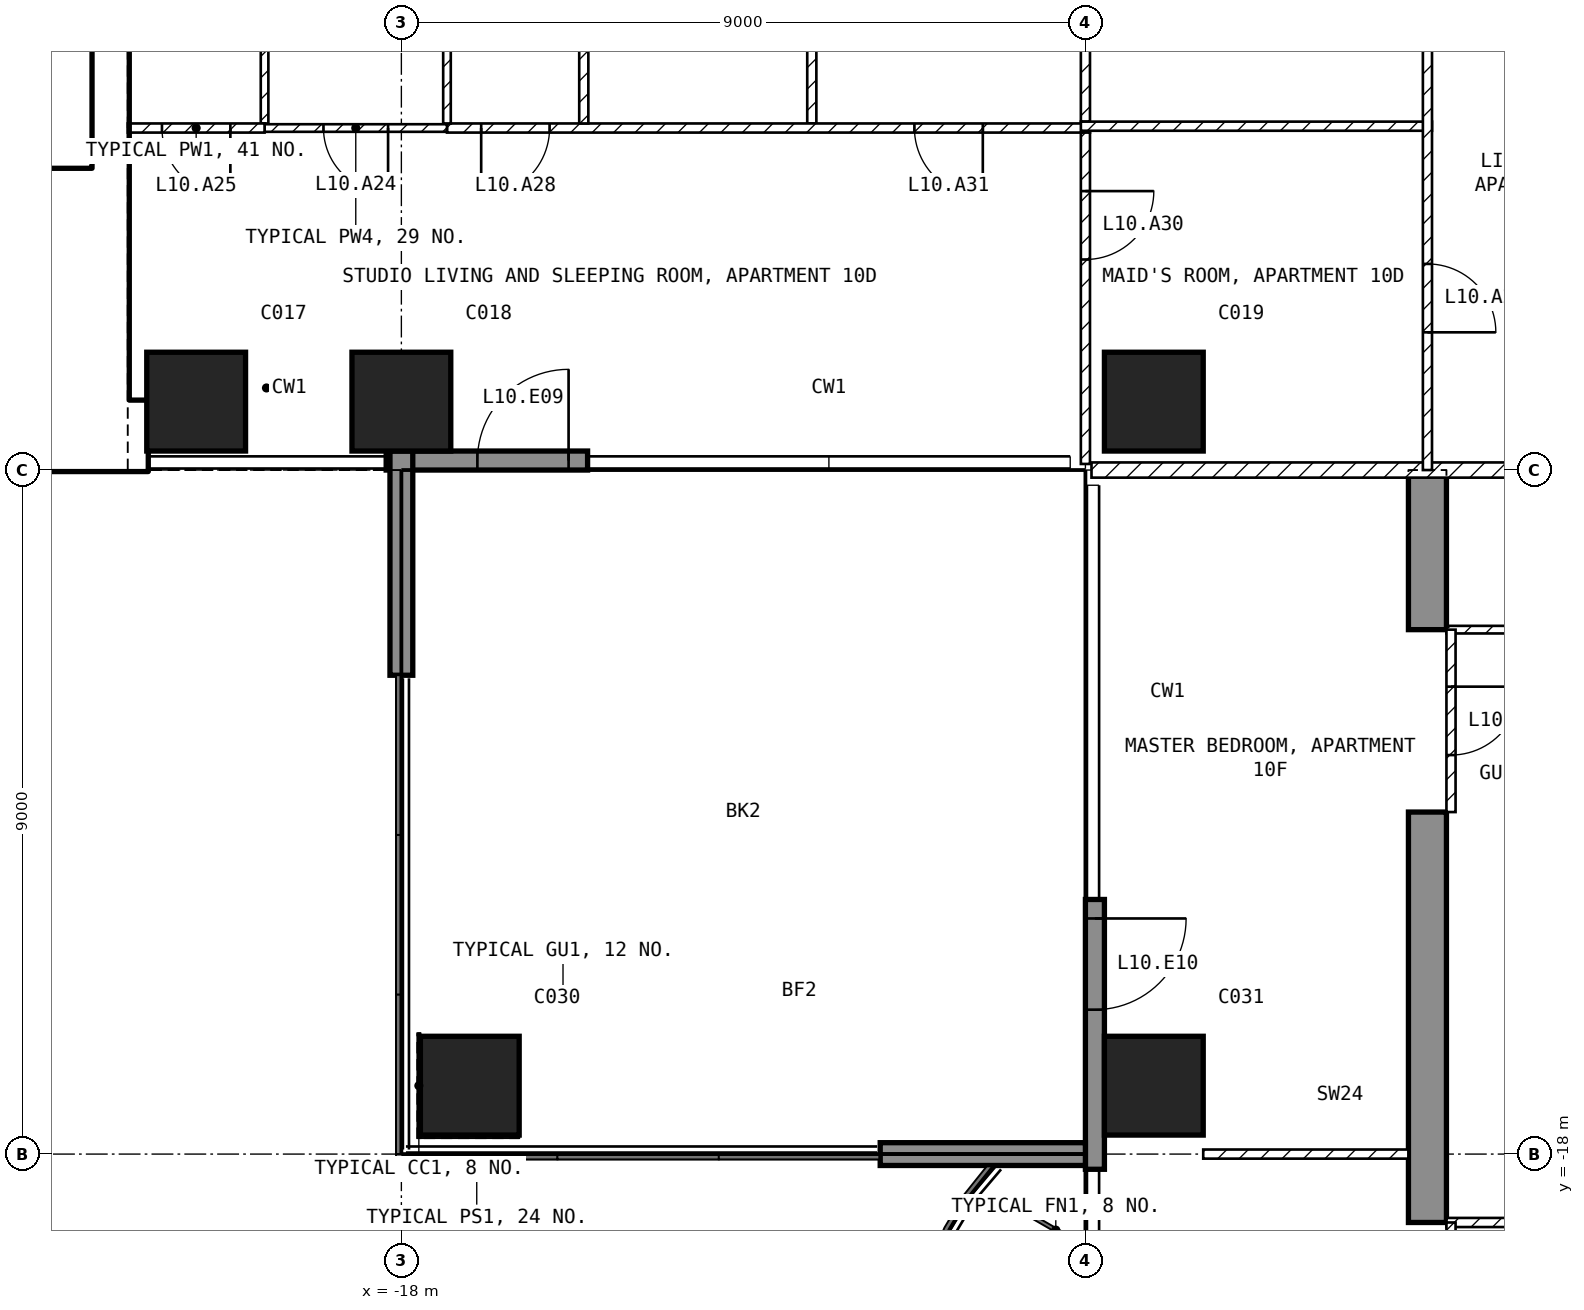
"""IFC4 building model, lengths in metres.
Left out: names, types, materials, properties, quantities, classifications, styles, units other than length and angle.
Written with IfcOpenShell. Run it as: python <this file> out.ifc"""

import sys

from ifc_helpers import new_model, si_unit, direction, frame, frame_2d, origin, origin_2d, place, context, subcontext, project, spatial, polyline, rectangle, outline, extrude, element, fill, save


model = new_model("IFC4")
c1 = context("Model", 3, precision=1e-05, world=origin(), true_north=direction((0.0, 1.0)))
c2 = subcontext(c1, "Body", "Model", "MODEL_VIEW")
j1 = project(units=[si_unit("LENGTHUNIT", "METRE"), si_unit("PLANEANGLEUNIT", "RADIAN")], contexts=[c1])
p1 = place(None, origin())
s1 = spatial("IfcSite", under=j1, at=p1, CompositionType="ELEMENT")
p2 = place(p1, origin())
s2 = spatial("IfcBuilding", under=s1, at=p2, CompositionType="ELEMENT")
p3 = place(p2, frame((0.0, 0.0, 54.0)))
s3 = spatial("IfcBuildingStorey", under=s2, at=p3, CompositionType="ELEMENT", Elevation=54.0)
for number, where, z_axis, x_axis in (
    (1, (-20.7, -8.1, -0.25), (0.0, 0.0, 1.0), (1.0, 0.0, 0.0)),
    (2, (-18.0, -8.1, -0.25), (0.0, 0.0, 1.0), (1.0, 0.0, 0.0)),
    (3, (-8.1, -17.1, -0.25), (0.0, 0.0, 1.0), (1.0, 0.0, 0.0)),
    (4, (-8.1, -8.1, -0.25), (0.0, 0.0, 1.0), (1.0, 0.0, 0.0)),
    (5, (-17.1, -17.1, -0.25), (0.0, 0.0, 1.0), (1.0, 0.0, 0.0)),
):
    element("IfcColumn", number, at=place(p3, frame(where, z_axis=z_axis, x_axis=x_axis)), inside=s3, PredefinedType="COLUMN", context=c2, shape_type="SweptSolid", body=[
        extrude(rectangle(XDim=1.3, YDim=1.3, at=origin_2d()), origin(), (0.0, 0.0, 1.0), 3.5),
    ])
p4 = place(p3, frame((-4.75, -25.45, -0.25), z_axis=(1.0, 0.0, 0.0), x_axis=(0.0, 1.0, 0.0)))
e6 = element("IfcWall", 6, at=p4, inside=s3, PredefinedType="SHEAR", context=c2, shape_type="SweptSolid", body=[
    extrude(outline(polyline([(0.0, 0.0), (4.15, 0.0), (4.15, 2.65), (6.55, 2.65), (6.55, 0.0), (11.95, 0.0), (11.95, 2.65), (14.35, 2.65), (14.35, 0.0), (16.45, 0.0), (16.45, 3.5), (0.0, 3.5), (0.0, 0.0)])), origin(), (0.0, 0.0, 1.0), 0.5),
])
p5 = place(p3, frame((-18.2, -8.875, 0.0), z_axis=(0.0, 0.0, 1.0), x_axis=(1.0, 0.0, 0.0)))
e7 = element("IfcWall", 7, at=p5, inside=s3, PredefinedType="SOLIDWALL", context=c2, shape_type="SweptSolid", body=[
    extrude(rectangle(XDim=2.65, YDim=0.25, at=frame_2d((1.325, 0.0))), origin(), (0.0, 0.0, 1.0), 3.25),
])
p6 = place(p5, frame((1.2, 0.0, 0.0)))
e8 = element("IfcOpeningElement", 8, at=p6, cuts=e7, PredefinedType="OPENING", context=c2, shape_type="SweptSolid", body=[
    extrude(rectangle(XDim=1.2, YDim=2.4, at=frame_2d((0.6, 1.2))), frame((0.0, 0.135, 0.0), z_axis=(0.0, -1.0, 0.0), x_axis=(1.0, 0.0, 0.0)), (0.0, 0.0, 1.0), 0.27),
])
p7 = place(p3, frame((-8.875, -14.65, 0.0), z_axis=(0.0, 0.0, 1.0), x_axis=(0.0, -1.0, 0.0)))
e9 = element("IfcWall", 9, at=p7, inside=s3, PredefinedType="SOLIDWALL", context=c2, shape_type="SweptSolid", body=[
    extrude(rectangle(XDim=3.55, YDim=0.25, at=frame_2d((1.775, 0.0))), origin(), (0.0, 0.0, 1.0), 3.25),
])
p8 = place(p7, frame((0.25, 0.0, 0.0)))
e10 = element("IfcOpeningElement", 10, at=p8, cuts=e9, PredefinedType="OPENING", context=c2, shape_type="SweptSolid", body=[
    extrude(rectangle(XDim=1.2, YDim=2.4, at=frame_2d((0.6, 1.2))), frame((0.0, 0.135, 0.0), z_axis=(0.0, -1.0, 0.0), x_axis=(1.0, 0.0, 0.0)), (0.0, 0.0, 1.0), 0.27),
])
p9 = place(p3, frame((-18.0, -8.75, 0.0), z_axis=(0.0, 0.0, 1.0), x_axis=(0.0, -1.0, 0.0)))
e11 = element("IfcWall", 11, at=p9, inside=s3, PredefinedType="SOLIDWALL", context=c2, shape_type="SweptSolid", body=[
    extrude(rectangle(XDim=2.95, YDim=0.3, at=frame_2d((1.475, 0.0))), origin(), (0.0, 0.0, 1.0), 3.25),
])
p10 = place(p3, frame((-9.0, -18.0, 0.0), z_axis=(0.0, 0.0, 1.0), x_axis=(-1.0, 0.0, 0.0)))
e12 = element("IfcWall", 12, at=p10, inside=s3, PredefinedType="SOLIDWALL", context=c2, shape_type="SweptSolid", body=[
    extrude(rectangle(XDim=2.7, YDim=0.3, at=frame_2d((1.35, 0.0))), origin(), (0.0, 0.0, 1.0), 3.25),
])
p11 = place(p3, frame((-32.4, -8.55, 0.0), z_axis=(0.0, 0.0, 1.0), x_axis=(1.0, 0.0, 0.0)))
e13 = element("IfcWall", 13, at=p11, inside=s3, PredefinedType="SHEAR", context=c2, shape_type="SweptSolid", body=[
    extrude(rectangle(XDim=11.05, YDim=0.9, at=frame_2d((5.525, 0.0))), origin(), (0.0, 0.0, 1.0), 3.25),
])
p12 = place(p3, frame((-21.825, -8.1, 0.0), z_axis=(0.0, 0.0, 1.0), x_axis=(0.0, 1.0, 0.0)))
e14 = element("IfcWall", 14, at=p12, inside=s3, PredefinedType="SHEAR", context=c2, shape_type="SweptSolid", body=[
    extrude(rectangle(XDim=6.9, YDim=0.45, at=frame_2d((3.45, 0.0))), origin(), (0.0, 0.0, 1.0), 3.25),
])
p13 = place(p3, frame((-28.35, -5.15, 0.0), z_axis=(0.0, 0.0, 1.0), x_axis=(1.0, 0.0, 0.0)))
e15 = element("IfcWall", 15, at=p13, inside=s3, PredefinedType="SOLIDWALL", context=c2, shape_type="SweptSolid", body=[
    extrude(rectangle(XDim=6.3, YDim=0.2, at=frame_2d((3.15, 0.0))), origin(), (0.0, 0.0, 1.0), 3.25),
])
p14 = place(p13, frame((5.1, 0.0, 0.0)))
e16 = element("IfcOpeningElement", 16, at=p14, cuts=e15, PredefinedType="OPENING", context=c2, shape_type="SweptSolid", body=[
    extrude(rectangle(XDim=1.0, YDim=2.1, at=frame_2d((0.5, 1.05))), frame((0.0, 0.11, 0.0), z_axis=(0.0, -1.0, 0.0), x_axis=(1.0, 0.0, 0.0)), (0.0, 0.0, 1.0), 0.22),
])
p15 = place(p3, frame((8.92, -9.0, 0.0), z_axis=(0.0, 0.0, 1.0), x_axis=(-1.0, 0.0, 0.0)))
e17 = element("IfcWall", 17, at=p15, inside=s3, PredefinedType="PARTITIONING", context=c2, shape_type="SweptSolid", body=[
    extrude(rectangle(XDim=17.84, YDim=0.2, at=frame_2d((8.92, 0.0))), origin(), (0.0, 0.0, 1.0), 3.25),
])
p16 = place(p15, frame((8.42, 0.0, 0.0)))
e18 = element("IfcOpeningElement", 18, at=p16, cuts=e17, PredefinedType="OPENING", context=c2, shape_type="SweptSolid", body=[
    extrude(rectangle(XDim=1.0, YDim=2.1, at=frame_2d((0.5, 1.05))), frame((0.0, 0.11, 0.0), z_axis=(0.0, -1.0, 0.0), x_axis=(1.0, 0.0, 0.0)), (0.0, 0.0, 1.0), 0.22),
])
p17 = place(p3, frame((-12.6, -4.44, 0.0), z_axis=(0.0, 0.0, 1.0), x_axis=(0.0, 1.0, 0.0)))
e19 = element("IfcWall", 19, at=p17, inside=s3, PredefinedType="PARTITIONING", context=c2, shape_type="SweptSolid", body=[
    extrude(rectangle(XDim=3.14, YDim=0.12, at=frame_2d((1.57, 0.0))), origin(), (0.0, 0.0, 1.0), 3.25),
])
p18 = place(p17, frame((1.12, 0.0, 0.0)))
e20 = element("IfcOpeningElement", 20, at=p18, cuts=e19, PredefinedType="OPENING", context=c2, shape_type="SweptSolid", body=[
    extrude(rectangle(XDim=0.9, YDim=2.1, at=frame_2d((0.45, 1.05))), frame((0.0, 0.07, 0.0), z_axis=(0.0, -1.0, 0.0), x_axis=(1.0, 0.0, 0.0)), (0.0, 0.0, 1.0), 0.14),
])
p19 = place(p3, frame((-8.94, -4.5, 0.0), z_axis=(0.0, 0.0, 1.0), x_axis=(-1.0, 0.0, 0.0)))
e21 = element("IfcWall", 21, at=p19, inside=s3, PredefinedType="PARTITIONING", context=c2, shape_type="SweptSolid", body=[
    extrude(rectangle(XDim=8.46, YDim=0.12, at=frame_2d((4.23, 0.0))), origin(), (0.0, 0.0, 1.0), 3.25),
])
p20 = place(p19, frame((7.11, 0.0, 0.0)))
e22 = element("IfcOpeningElement", 22, at=p20, cuts=e21, PredefinedType="OPENING", context=c2, shape_type="SweptSolid", body=[
    extrude(rectangle(XDim=0.9, YDim=2.1, at=frame_2d((0.45, 1.05))), frame((0.0, 0.07, 0.0), z_axis=(0.0, -1.0, 0.0), x_axis=(1.0, 0.0, 0.0)), (0.0, 0.0, 1.0), 0.14),
])
p21 = place(p19, frame((1.41, 0.0, 0.0)))
e23 = element("IfcOpeningElement", 23, at=p21, cuts=e21, PredefinedType="OPENING", context=c2, shape_type="SweptSolid", body=[
    extrude(rectangle(XDim=0.9, YDim=2.1, at=frame_2d((0.45, 1.05))), frame((0.0, 0.07, 0.0), z_axis=(0.0, -1.0, 0.0), x_axis=(1.0, 0.0, 0.0)), (0.0, 0.0, 1.0), 0.14),
])
p22 = place(p3, frame((-9.0, -1.3, 0.0), z_axis=(0.0, 0.0, 1.0), x_axis=(0.0, -1.0, 0.0)))
e24 = element("IfcWall", 24, at=p22, inside=s3, PredefinedType="PARTITIONING", context=c2, shape_type="SweptSolid", body=[
    extrude(rectangle(XDim=3.116, YDim=0.12, at=frame_2d((1.558, 0.0))), origin(), (0.0, 0.0, 1.0), 3.25),
])
p23 = place(p22, frame((1.108, 0.0, 0.0)))
e25 = element("IfcOpeningElement", 25, at=p23, cuts=e24, PredefinedType="OPENING", context=c2, shape_type="SweptSolid", body=[
    extrude(rectangle(XDim=0.9, YDim=2.1, at=frame_2d((0.45, 1.05))), frame((0.0, 0.07, 0.0), z_axis=(0.0, -1.0, 0.0), x_axis=(1.0, 0.0, 0.0)), (0.0, 0.0, 1.0), 0.14),
])
p24 = place(p3, frame((-15.6, -4.44, 0.0), z_axis=(0.0, 0.0, 1.0), x_axis=(0.0, 1.0, 0.0)))
e26 = element("IfcWall", 26, at=p24, inside=s3, PredefinedType="PARTITIONING", context=c2, shape_type="SweptSolid", body=[
    extrude(rectangle(XDim=3.14, YDim=0.12, at=frame_2d((1.57, 0.0))), origin(), (0.0, 0.0, 1.0), 3.25),
])
for number, where, z_axis, x_axis in (
    (27, (-17.4, -4.44, 0.0), (0.0, 0.0, 1.0), (0.0, 1.0, 0.0)),
    (28, (-19.8, -4.44, 0.0), (0.0, 0.0, 1.0), (0.0, 1.0, 0.0)),
):
    element("IfcWall", number, at=place(p3, frame(where, z_axis=z_axis, x_axis=x_axis)), inside=s3, PredefinedType="PARTITIONING", context=c2, shape_type="SweptSolid", body=[
        extrude(rectangle(XDim=3.14, YDim=0.1, at=frame_2d((1.57, 0.0))), origin(), (0.0, 0.0, 1.0), 3.25),
    ])
p25 = place(p3, frame((-17.4, -4.5, 0.0), z_axis=(0.0, 0.0, 1.0), x_axis=(-1.0, 0.0, 0.0)))
e29 = element("IfcWall", 29, at=p25, inside=s3, PredefinedType="PARTITIONING", context=c2, shape_type="SweptSolid", body=[
    extrude(rectangle(XDim=2.4, YDim=0.1, at=frame_2d((1.2, 0.0))), origin(), (0.0, 0.0, 1.0), 3.25),
])
p26 = place(p25, frame((0.775, 0.0, 0.0)))
e30 = element("IfcOpeningElement", 30, at=p26, cuts=e29, PredefinedType="OPENING", context=c2, shape_type="SweptSolid", body=[
    extrude(rectangle(XDim=0.85, YDim=2.1, at=frame_2d((0.425, 1.05))), frame((0.0, 0.06, 0.0), z_axis=(0.0, -1.0, 0.0), x_axis=(1.0, 0.0, 0.0)), (0.0, 0.0, 1.0), 0.12),
])
p27 = place(p3, frame((-19.8, -4.5, 0.0), z_axis=(0.0, 0.0, 1.0), x_axis=(-1.0, 0.0, 0.0)))
e31 = element("IfcWall", 31, at=p27, inside=s3, PredefinedType="PARTITIONING", context=c2, shape_type="SweptSolid", body=[
    extrude(rectangle(XDim=1.8, YDim=0.12, at=frame_2d((0.9, 0.0))), origin(), (0.0, 0.0, 1.0), 3.25),
])
p28 = place(p27, frame((0.45, 0.0, 0.0)))
e32 = element("IfcOpeningElement", 32, at=p28, cuts=e31, PredefinedType="OPENING", context=c2, shape_type="SweptSolid", body=[
    extrude(rectangle(XDim=0.9, YDim=2.1, at=frame_2d((0.45, 1.05))), frame((0.0, 0.07, 0.0), z_axis=(0.0, -1.0, 0.0), x_axis=(1.0, 0.0, 0.0)), (0.0, 0.0, 1.0), 0.14),
])
p29 = place(p3, frame((-9.0, -4.56, 0.0), z_axis=(0.0, 0.0, 1.0), x_axis=(0.0, -1.0, 0.0)))
e33 = element("IfcWall", 33, at=p29, inside=s3, PredefinedType="PARTITIONING", context=c2, shape_type="SweptSolid", body=[
    extrude(rectangle(XDim=4.36, YDim=0.12, at=frame_2d((2.18, 0.0))), origin(), (0.0, 0.0, 1.0), 3.25),
])
p30 = place(p29, frame((0.77, 0.0, 0.0)))
e34 = element("IfcOpeningElement", 34, at=p30, cuts=e33, PredefinedType="OPENING", context=c2, shape_type="SweptSolid", body=[
    extrude(rectangle(XDim=0.9, YDim=2.1, at=frame_2d((0.45, 1.05))), frame((0.0, 0.07, 0.0), z_axis=(0.0, -1.0, 0.0), x_axis=(1.0, 0.0, 0.0)), (0.0, 0.0, 1.0), 0.14),
])
p31 = place(p3, frame((-4.44, -4.476, 0.0), z_axis=(0.0, 0.0, 1.0), x_axis=(-1.0, 0.0, 0.0)))
e35 = element("IfcWall", 35, at=p31, inside=s3, PredefinedType="PARTITIONING", context=c2, shape_type="SweptSolid", body=[
    extrude(rectangle(XDim=4.62, YDim=0.12, at=frame_2d((2.31, 0.0))), origin(), (0.0, 0.0, 1.0), 3.25),
])
p32 = place(p3, frame((-4.5, -1.3, 0.0), z_axis=(0.0, 0.0, 1.0), x_axis=(0.0, -1.0, 0.0)))
e36 = element("IfcWall", 36, at=p32, inside=s3, PredefinedType="PARTITIONING", context=c2, shape_type="SweptSolid", body=[
    extrude(rectangle(XDim=7.7, YDim=0.12, at=frame_2d((3.85, 0.0))), origin(), (0.0, 0.0, 1.0), 3.25),
])
p33 = place(p32, frame((4.988, 0.0, 0.0)))
e37 = element("IfcOpeningElement", 37, at=p33, cuts=e36, PredefinedType="OPENING", context=c2, shape_type="SweptSolid", body=[
    extrude(rectangle(XDim=0.9, YDim=2.1, at=frame_2d((0.45, 1.05))), frame((0.0, 0.07, 0.0), z_axis=(0.0, -1.0, 0.0), x_axis=(1.0, 0.0, 0.0)), (0.0, 0.0, 1.0), 0.14),
])
p34 = place(p3, frame((-2.1, -11.1, 0.0), z_axis=(0.0, 0.0, 1.0), x_axis=(-1.0, 0.0, 0.0)))
e38 = element("IfcWall", 38, at=p34, inside=s3, PredefinedType="PARTITIONING", context=c2, shape_type="SweptSolid", body=[
    extrude(rectangle(XDim=2.15, YDim=0.1, at=frame_2d((1.075, 0.0))), origin(), (0.0, 0.0, 1.0), 3.25),
])
p35 = place(p3, frame((4.25, -18.9, 0.0), z_axis=(0.0, 0.0, 1.0), x_axis=(-1.0, 0.0, 0.0)))
e39 = element("IfcWall", 39, at=p35, inside=s3, PredefinedType="PARTITIONING", context=c2, shape_type="SweptSolid", body=[
    extrude(rectangle(XDim=8.5, YDim=0.12, at=frame_2d((4.25, 0.0))), origin(), (0.0, 0.0, 1.0), 3.25),
])
p36 = place(p35, frame((5.675, 0.0, 0.0)))
e40 = element("IfcOpeningElement", 40, at=p36, cuts=e39, PredefinedType="OPENING", context=c2, shape_type="SweptSolid", body=[
    extrude(rectangle(XDim=0.9, YDim=2.1, at=frame_2d((0.45, 1.05))), frame((0.0, 0.07, 0.0), z_axis=(0.0, -1.0, 0.0), x_axis=(1.0, 0.0, 0.0)), (0.0, 0.0, 1.0), 0.14),
])
p37 = place(p3, frame((-4.75, -18.0, 0.0), z_axis=(0.0, 0.0, 1.0), x_axis=(-1.0, 0.0, 0.0)))
e41 = element("IfcWall", 41, at=p37, inside=s3, PredefinedType="PARTITIONING", context=c2, shape_type="SweptSolid", body=[
    extrude(rectangle(XDim=2.7, YDim=0.12, at=frame_2d((1.35, 0.0))), origin(), (0.0, 0.0, 1.0), 3.25),
])
p38 = place(p3, frame((-4.19, -11.1, 0.0), z_axis=(0.0, 0.0, 1.0), x_axis=(0.0, -1.0, 0.0)))
e42 = element("IfcWall", 42, at=p38, inside=s3, PredefinedType="PARTITIONING", context=c2, shape_type="SweptSolid", body=[
    extrude(rectangle(XDim=2.4, YDim=0.12, at=frame_2d((1.2, 0.0))), origin(), (0.0, 0.0, 1.0), 2.4),
])
p39 = place(p38, frame((0.75, 0.0, 0.0)))
e43 = element("IfcOpeningElement", 43, at=p39, cuts=e42, PredefinedType="OPENING", context=c2, shape_type="SweptSolid", body=[
    extrude(rectangle(XDim=0.9, YDim=2.1, at=frame_2d((0.45, 1.05))), frame((0.0, 0.07, 0.0), z_axis=(0.0, -1.0, 0.0), x_axis=(1.0, 0.0, 0.0)), (0.0, 0.0, 1.0), 0.14),
])
p40 = place(p3, frame((-4.19, -18.9, 0.0), z_axis=(0.0, 0.0, 1.0), x_axis=(0.0, -1.0, 0.0)))
e44 = element("IfcWall", 44, at=p40, inside=s3, PredefinedType="PARTITIONING", context=c2, shape_type="SweptSolid", body=[
    extrude(rectangle(XDim=2.4, YDim=0.12, at=frame_2d((1.2, 0.0))), origin(), (0.0, 0.0, 1.0), 2.4),
])
p41 = place(p40, frame((0.75, 0.0, 0.0)))
e45 = element("IfcOpeningElement", 45, at=p41, cuts=e44, PredefinedType="OPENING", context=c2, shape_type="SweptSolid", body=[
    extrude(rectangle(XDim=0.9, YDim=2.1, at=frame_2d((0.45, 1.05))), frame((0.0, 0.07, 0.0), z_axis=(0.0, -1.0, 0.0), x_axis=(1.0, 0.0, 0.0)), (0.0, 0.0, 1.0), 0.14),
])
p42 = place(p6, origin())
e46 = element("IfcDoor", 46, at=p42, inside=s3, OperationType="SINGLE_SWING_RIGHT", PredefinedType="DOOR", context=c2, shape_type="SweptSolid", body=[
    extrude(rectangle(XDim=1.2, YDim=2.4, at=frame_2d((0.6, 1.2))), frame((0.0, 0.025, 0.0), z_axis=(0.0, -1.0, 0.0), x_axis=(1.0, 0.0, 0.0)), (0.0, 0.0, 1.0), 0.05),
])
fill(e8, e46)
p43 = place(p8, origin())
e47 = element("IfcDoor", 47, at=p43, inside=s3, OperationType="SINGLE_SWING_LEFT", PredefinedType="DOOR", context=c2, shape_type="SweptSolid", body=[
    extrude(rectangle(XDim=1.2, YDim=2.4, at=frame_2d((0.6, 1.2))), frame((0.0, 0.025, 0.0), z_axis=(0.0, -1.0, 0.0), x_axis=(1.0, 0.0, 0.0)), (0.0, 0.0, 1.0), 0.05),
])
fill(e10, e47)
p44 = place(p14, origin())
e48 = element("IfcDoor", 48, at=p44, inside=s3, OperationType="SINGLE_SWING_LEFT", PredefinedType="DOOR", context=c2, shape_type="SweptSolid", body=[
    extrude(rectangle(XDim=1.0, YDim=2.1, at=frame_2d((0.5, 1.05))), frame((0.0, 0.025, 0.0), z_axis=(0.0, -1.0, 0.0), x_axis=(1.0, 0.0, 0.0)), (0.0, 0.0, 1.0), 0.05),
])
fill(e16, e48)
p45 = place(p26, origin())
e49 = element("IfcDoor", 49, at=p45, inside=s3, OperationType="SINGLE_SWING_LEFT", PredefinedType="DOOR", context=c2, shape_type="SweptSolid", body=[
    extrude(rectangle(XDim=0.85, YDim=2.1, at=frame_2d((0.425, 1.05))), frame((0.0, 0.025, 0.0), z_axis=(0.0, -1.0, 0.0), x_axis=(1.0, 0.0, 0.0)), (0.0, 0.0, 1.0), 0.05),
])
fill(e30, e49)
p46 = place(p28, origin())
e50 = element("IfcDoor", 50, at=p46, inside=s3, OperationType="SINGLE_SWING_LEFT", PredefinedType="DOOR", context=c2, shape_type="SweptSolid", body=[
    extrude(rectangle(XDim=0.9, YDim=2.1, at=frame_2d((0.45, 1.05))), frame((0.0, 0.025, 0.0), z_axis=(0.0, -1.0, 0.0), x_axis=(1.0, 0.0, 0.0)), (0.0, 0.0, 1.0), 0.05),
])
fill(e32, e50)
p47 = place(p20, origin())
e51 = element("IfcDoor", 51, at=p47, inside=s3, OperationType="SINGLE_SWING_RIGHT", PredefinedType="DOOR", context=c2, shape_type="SweptSolid", body=[
    extrude(rectangle(XDim=0.9, YDim=2.1, at=frame_2d((0.45, 1.05))), frame((0.0, 0.025, 0.0), z_axis=(0.0, -1.0, 0.0), x_axis=(1.0, 0.0, 0.0)), (0.0, 0.0, 1.0), 0.05),
])
fill(e22, e51)
p48 = place(p33, origin())
e52 = element("IfcDoor", 52, at=p48, inside=s3, OperationType="SINGLE_SWING_RIGHT", PredefinedType="DOOR", context=c2, shape_type="SweptSolid", body=[
    extrude(rectangle(XDim=0.9, YDim=2.1, at=frame_2d((0.45, 1.05))), frame((0.0, 0.025, 0.0), z_axis=(0.0, -1.0, 0.0), x_axis=(1.0, 0.0, 0.0)), (0.0, 0.0, 1.0), 0.05),
])
fill(e37, e52)
p49 = place(p30, origin())
e53 = element("IfcDoor", 53, at=p49, inside=s3, OperationType="SINGLE_SWING_LEFT", PredefinedType="DOOR", context=c2, shape_type="SweptSolid", body=[
    extrude(rectangle(XDim=0.9, YDim=2.1, at=frame_2d((0.45, 1.05))), frame((0.0, 0.025, 0.0), z_axis=(0.0, -1.0, 0.0), x_axis=(1.0, 0.0, 0.0)), (0.0, 0.0, 1.0), 0.05),
])
fill(e34, e53)
p50 = place(p21, origin())
e54 = element("IfcDoor", 54, at=p50, inside=s3, OperationType="SINGLE_SWING_LEFT", PredefinedType="DOOR", context=c2, shape_type="SweptSolid", body=[
    extrude(rectangle(XDim=0.9, YDim=2.1, at=frame_2d((0.45, 1.05))), frame((0.0, 0.025, 0.0), z_axis=(0.0, -1.0, 0.0), x_axis=(1.0, 0.0, 0.0)), (0.0, 0.0, 1.0), 0.05),
])
fill(e23, e54)
p51 = place(p39, origin())
e55 = element("IfcDoor", 55, at=p51, inside=s3, OperationType="SINGLE_SWING_LEFT", PredefinedType="DOOR", context=c2, shape_type="SweptSolid", body=[
    extrude(rectangle(XDim=0.9, YDim=2.1, at=frame_2d((0.45, 1.05))), frame((0.0, 0.025, 0.0), z_axis=(0.0, -1.0, 0.0), x_axis=(1.0, 0.0, 0.0)), (0.0, 0.0, 1.0), 0.05),
])
fill(e43, e55)
save(model, sys.argv[1])
